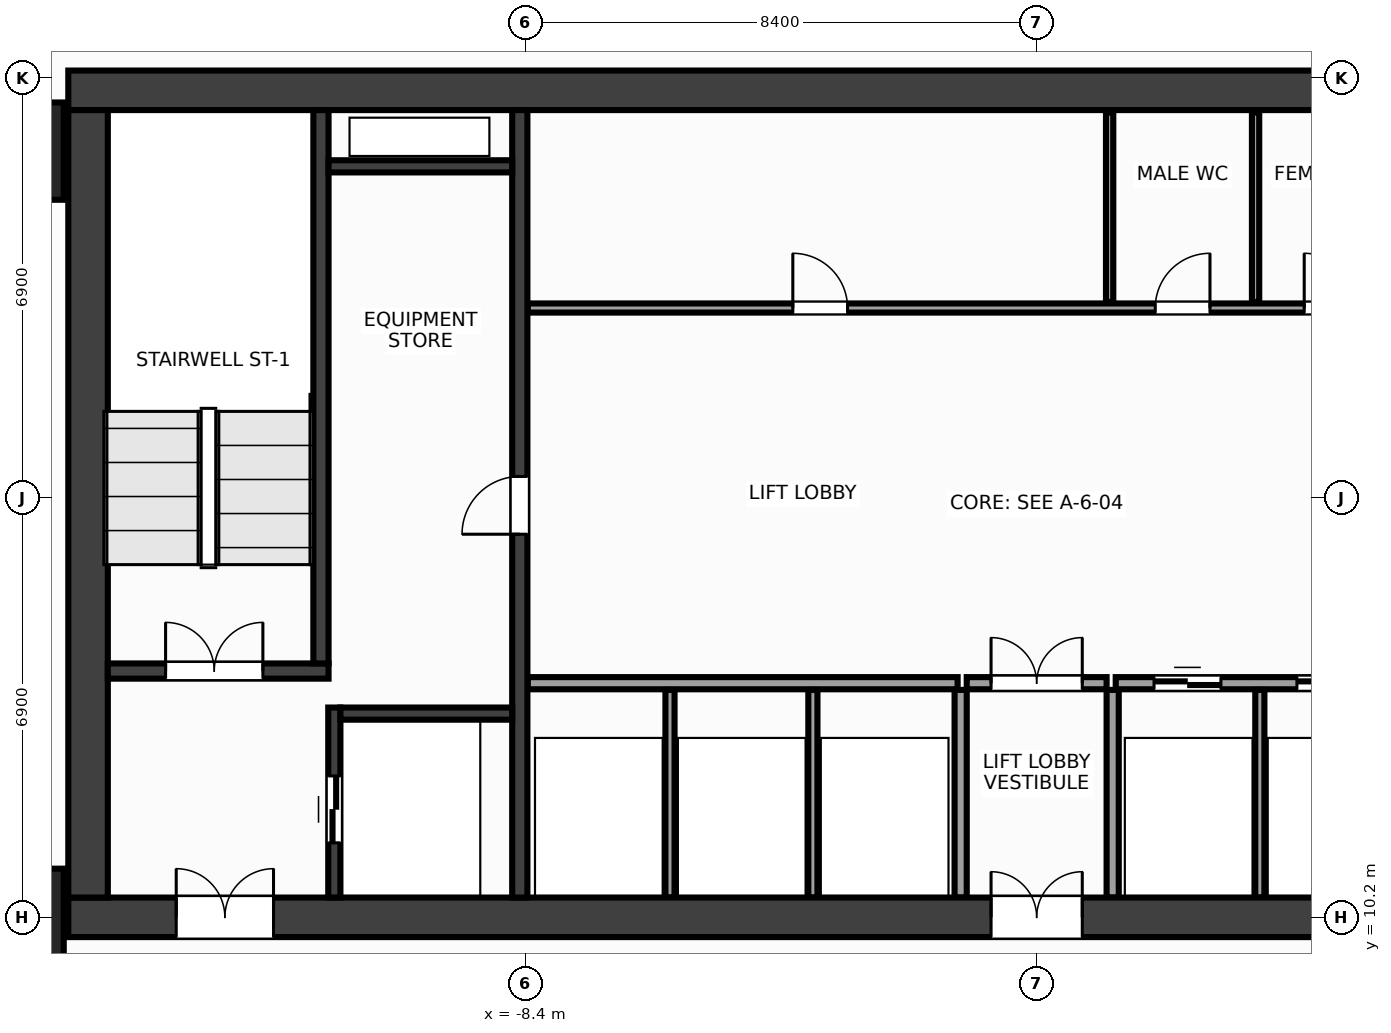
"""IFC4 building model, lengths in metres.
Left out: names, types, materials, properties, quantities, classifications, styles, units other than length and angle.
Written with IfcOpenShell. Run it as: python <this file> out.ifc"""

import sys

from ifc_helpers import new_model, si_unit, direction, frame, frame_2d, origin, origin_2d, place, context, subcontext, project, spatial, rectangle, extrude, source, transform, mapped, element, fill, save


model = new_model("IFC4")
c1 = context("Model", 3, precision=1e-05, world=origin(), true_north=direction((0.0, 1.0)))
c2 = subcontext(c1, "Body", "Model", "MODEL_VIEW")
j1 = project(units=[si_unit("LENGTHUNIT", "METRE"), si_unit("PLANEANGLEUNIT", "RADIAN")], contexts=[c1])
p1 = place(None, origin())
s1 = spatial("IfcSite", under=j1, at=p1, CompositionType="ELEMENT")
p2 = place(p1, origin())
s2 = spatial("IfcBuilding", under=s1, at=p2, CompositionType="ELEMENT")
p3 = place(p2, frame((0.0, 0.0, 81.2)))
s3 = spatial("IfcBuildingStorey", under=s2, at=p3, CompositionType="ELEMENT", Elevation=81.2)
m1 = source(origin(), c2, "Body", "SweptSolid", [
    extrude(rectangle(XDim=31.85, YDim=0.65, at=frame_2d((15.925, 0.0))), origin(), (0.0, 0.0, 1.0), 3.6),
])
p4 = place(p3, frame((-15.925, 23.8, 0.0), z_axis=(0.0, 0.0, 1.0), x_axis=(1.0, 0.0, 0.0)))
e1 = element("IfcWall", 1, at=p4, inside=s3, PredefinedType="SHEAR", context=c2, shape_type="MappedRepresentation", body=[
    mapped(m1, transform((0.0, 0.0, 0.0), x_axis=(1.0, 0.0, 0.0), y_axis=(0.0, 1.0, 0.0), z_axis=(0.0, 0.0, 1.0), scale=1.0)),
])
p5 = place(p3, frame((-15.925, 10.2, 0.0), z_axis=(0.0, 0.0, 1.0), x_axis=(1.0, 0.0, 0.0)))
e2 = element("IfcWall", 2, at=p5, inside=s3, PredefinedType="SHEAR", context=c2, shape_type="MappedRepresentation", body=[
    mapped(m1, transform((0.0, 0.0, 0.0), x_axis=(1.0, 0.0, 0.0), y_axis=(0.0, 1.0, 0.0), z_axis=(0.0, 0.0, 1.0), scale=1.0)),
])
p6 = place(p5, frame((1.775, 0.0, 0.0)))
e3 = element("IfcOpeningElement", 3, at=p6, cuts=e2, PredefinedType="OPENING", context=c2, shape_type="SweptSolid", body=[
    extrude(rectangle(XDim=1.6, YDim=2.15, at=frame_2d((0.8, 1.075))), frame((0.0, 0.337, 0.0), z_axis=(0.0, -1.0, 0.0), x_axis=(1.0, 0.0, 0.0)), (0.0, 0.0, 1.0), 0.674),
])
p7 = place(p5, frame((28.475, 0.0, 0.0)))
e4 = element("IfcOpeningElement", 4, at=p7, cuts=e2, PredefinedType="OPENING", context=c2, shape_type="SweptSolid", body=[
    extrude(rectangle(XDim=1.6, YDim=2.15, at=frame_2d((0.8, 1.075))), frame((0.0, 0.337, 0.0), z_axis=(0.0, -1.0, 0.0), x_axis=(1.0, 0.0, 0.0)), (0.0, 0.0, 1.0), 0.674),
])
p8 = place(p5, frame((15.175, 0.0, 0.0)))
e5 = element("IfcOpeningElement", 5, at=p8, cuts=e2, PredefinedType="OPENING", context=c2, shape_type="SweptSolid", body=[
    extrude(rectangle(XDim=1.5, YDim=2.2, at=frame_2d((0.75, 1.1))), frame((0.0, 0.337, 0.0), z_axis=(0.0, -1.0, 0.0), x_axis=(1.0, 0.0, 0.0)), (0.0, 0.0, 1.0), 0.674),
])
m2 = source(origin(), c2, "Body", "SweptSolid", [
    extrude(rectangle(XDim=12.95, YDim=0.65, at=frame_2d((6.475, 0.0))), origin(), (0.0, 0.0, 1.0), 3.6),
])
p9 = place(p3, frame((-15.6, 10.525, 0.0), z_axis=(0.0, 0.0, 1.0), x_axis=(0.0, 1.0, 0.0)))
e6 = element("IfcWall", 6, at=p9, inside=s3, PredefinedType="SHEAR", context=c2, shape_type="MappedRepresentation", body=[
    mapped(m2, transform((0.0, 0.0, 0.0), x_axis=(1.0, 0.0, 0.0), y_axis=(0.0, 1.0, 0.0), z_axis=(0.0, 0.0, 1.0), scale=1.0)),
])
m3 = source(origin(), c2, "Body", "SweptSolid", [
    extrude(rectangle(XDim=12.95, YDim=0.25, at=frame_2d((6.475, 0.0))), origin(), (0.0, 0.0, 1.0), 3.6),
])
p10 = place(p3, frame((-8.5, 10.525, 0.0), z_axis=(0.0, 0.0, 1.0), x_axis=(0.0, 1.0, 0.0)))
e7 = element("IfcWall", 7, at=p10, inside=s3, PredefinedType="SHEAR", context=c2, shape_type="MappedRepresentation", body=[
    mapped(m3, transform((0.0, 0.0, 0.0), x_axis=(1.0, 0.0, 0.0), y_axis=(0.0, 1.0, 0.0), z_axis=(0.0, 0.0, 1.0), scale=1.0)),
])
p11 = place(p10, frame((5.975, 0.0, 0.0)))
e8 = element("IfcOpeningElement", 8, at=p11, cuts=e7, PredefinedType="OPENING", context=c2, shape_type="SweptSolid", body=[
    extrude(rectangle(XDim=0.95, YDim=2.15, at=frame_2d((0.475, 1.075))), frame((0.0, 0.137, 0.0), z_axis=(0.0, -1.0, 0.0), x_axis=(1.0, 0.0, 0.0)), (0.0, 0.0, 1.0), 0.274),
])
m4 = source(origin(), c2, "Body", "SweptSolid", [
    extrude(rectangle(XDim=3.63, YDim=0.25, at=frame_2d((1.815, 0.0))), origin(), (0.0, 0.0, 1.0), 3.6),
])
p12 = place(p3, frame((-15.275, 14.25, 0.0), z_axis=(0.0, 0.0, 1.0), x_axis=(1.0, 0.0, 0.0)))
e9 = element("IfcWall", 9, at=p12, inside=s3, PredefinedType="SHEAR", context=c2, shape_type="MappedRepresentation", body=[
    mapped(m4, transform((0.0, 0.0, 0.0), x_axis=(1.0, 0.0, 0.0), y_axis=(0.0, 1.0, 0.0), z_axis=(0.0, 0.0, 1.0), scale=1.0)),
])
p13 = place(p12, frame((0.95, 0.0, 0.0)))
e10 = element("IfcOpeningElement", 10, at=p13, cuts=e9, PredefinedType="OPENING", context=c2, shape_type="SweptSolid", body=[
    extrude(rectangle(XDim=1.6, YDim=2.15, at=frame_2d((0.8, 1.075))), frame((0.0, 0.137, 0.0), z_axis=(0.0, -1.0, 0.0), x_axis=(1.0, 0.0, 0.0)), (0.0, 0.0, 1.0), 0.274),
])
m5 = source(origin(), c2, "Body", "SweptSolid", [
    extrude(rectangle(XDim=9.1, YDim=0.25, at=frame_2d((4.55, 0.0))), origin(), (0.0, 0.0, 1.0), 3.6),
])
p14 = place(p3, frame((-11.77, 14.375, 0.0), z_axis=(0.0, 0.0, 1.0), x_axis=(0.0, 1.0, 0.0)))
e11 = element("IfcWall", 11, at=p14, inside=s3, PredefinedType="SHEAR", context=c2, shape_type="MappedRepresentation", body=[
    mapped(m5, transform((0.0, 0.0, 0.0), x_axis=(1.0, 0.0, 0.0), y_axis=(0.0, 1.0, 0.0), z_axis=(0.0, 0.0, 1.0), scale=1.0)),
])
m6 = source(origin(), c2, "Body", "SweptSolid", [
    extrude(rectangle(XDim=3.125, YDim=0.2, at=frame_2d((1.562, 0.0))), origin(), (0.0, 0.0, 1.0), 3.6),
])
p15 = place(p3, frame((-11.55, 10.525, 0.0), z_axis=(0.0, 0.0, 1.0), x_axis=(0.0, 1.0, 0.0)))
e12 = element("IfcWall", 12, at=p15, inside=s3, PredefinedType="SHEAR", context=c2, shape_type="MappedRepresentation", body=[
    mapped(m6, transform((0.0, 0.0, 0.0), x_axis=(1.0, 0.0, 0.0), y_axis=(0.0, 1.0, 0.0), z_axis=(0.0, 0.0, 1.0), scale=1.0)),
])
p16 = place(p15, frame((0.9, 0.0, 0.0)))
e13 = element("IfcOpeningElement", 13, at=p16, cuts=e12, PredefinedType="OPENING", context=c2, shape_type="SweptSolid", body=[
    extrude(rectangle(XDim=1.1, YDim=2.15, at=frame_2d((0.55, 1.075))), frame((0.0, 0.112, 0.0), z_axis=(0.0, -1.0, 0.0), x_axis=(1.0, 0.0, 0.0)), (0.0, 0.0, 1.0), 0.224),
])
m7 = source(origin(), c2, "Body", "SweptSolid", [
    extrude(rectangle(XDim=2.825, YDim=0.2, at=frame_2d((1.413, 0.0))), origin(), (0.0, 0.0, 1.0), 3.6),
])
p17 = place(p3, frame((-11.45, 13.55, 0.0), z_axis=(0.0, 0.0, 1.0), x_axis=(1.0, 0.0, 0.0)))
e14 = element("IfcWall", 14, at=p17, inside=s3, PredefinedType="SHEAR", context=c2, shape_type="MappedRepresentation", body=[
    mapped(m7, transform((0.0, 0.0, 0.0), x_axis=(1.0, 0.0, 0.0), y_axis=(0.0, 1.0, 0.0), z_axis=(0.0, 0.0, 1.0), scale=1.0)),
])
m8 = source(origin(), c2, "Body", "SweptSolid", [
    extrude(rectangle(XDim=3.02, YDim=0.2, at=frame_2d((1.51, 0.0))), origin(), (0.0, 0.0, 1.0), 3.6),
])
p18 = place(p3, frame((-11.645, 22.55, 0.0), z_axis=(0.0, 0.0, 1.0), x_axis=(1.0, 0.0, 0.0)))
e15 = element("IfcWall", 15, at=p18, inside=s3, PredefinedType="SHEAR", context=c2, shape_type="MappedRepresentation", body=[
    mapped(m8, transform((0.0, 0.0, 0.0), x_axis=(1.0, 0.0, 0.0), y_axis=(0.0, 1.0, 0.0), z_axis=(0.0, 0.0, 1.0), scale=1.0)),
])
m9 = source(origin(), c2, "Body", "SweptSolid", [
    extrude(rectangle(XDim=1.6, YDim=1.6, at=origin_2d()), origin(), (0.0, 0.0, 1.0), 3.6),
])
for number, where, z_axis, x_axis in (
    (16, (-16.8, 10.2, 0.0), (0.0, 0.0, 1.0), (1.0, 0.0, 0.0)),
    (17, (-16.8, 22.8, 0.0), (0.0, 0.0, 1.0), (1.0, 0.0, 0.0)),
):
    element("IfcColumn", number, at=place(p3, frame(where, z_axis=z_axis, x_axis=x_axis)), inside=s3, PredefinedType="COLUMN", context=c2, shape_type="MappedRepresentation", body=[
        mapped(m9, transform((0.0, 0.0, 0.0), x_axis=(1.0, 0.0, 0.0), y_axis=(0.0, 1.0, 0.0), z_axis=(0.0, 0.0, 1.0), scale=1.0)),
    ])
m10 = source(origin(), c2, "Body", "SweptSolid", [
    extrude(rectangle(XDim=7.07, YDim=0.2, at=frame_2d((3.535, 0.0))), origin(), (0.0, 0.0, 1.0), 3.36),
])
p19 = place(p3, frame((-8.37, 14.05, 0.0), z_axis=(0.0, 0.0, 1.0), x_axis=(1.0, 0.0, 0.0)))
e18 = element("IfcWall", 18, at=p19, inside=s3, PredefinedType="PARTITIONING", context=c2, shape_type="MappedRepresentation", body=[
    mapped(m10, transform((0.0, 0.0, 0.0), x_axis=(1.0, 0.0, 0.0), y_axis=(0.0, 1.0, 0.0), z_axis=(0.0, 0.0, 1.0), scale=1.0)),
])
p20 = place(p3, frame((1.3, 14.05, 0.0), z_axis=(0.0, 0.0, 1.0), x_axis=(1.0, 0.0, 0.0)))
e19 = element("IfcWall", 19, at=p20, inside=s3, PredefinedType="PARTITIONING", context=c2, shape_type="MappedRepresentation", body=[
    mapped(m10, transform((0.0, 0.0, 0.0), x_axis=(1.0, 0.0, 0.0), y_axis=(0.0, 1.0, 0.0), z_axis=(0.0, 0.0, 1.0), scale=1.0)),
])
p21 = place(p20, frame((0.63, 0.0, 0.0)))
e20 = element("IfcOpeningElement", 20, at=p21, cuts=e19, PredefinedType="OPENING", context=c2, shape_type="SweptSolid", body=[
    extrude(rectangle(XDim=1.1, YDim=2.15, at=frame_2d((0.55, 1.075))), frame((0.0, 0.112, 0.0), z_axis=(0.0, -1.0, 0.0), x_axis=(1.0, 0.0, 0.0)), (0.0, 0.0, 1.0), 0.224),
])
p22 = place(p20, frame((2.98, 0.0, 0.0)))
e21 = element("IfcOpeningElement", 21, at=p22, cuts=e19, PredefinedType="OPENING", context=c2, shape_type="SweptSolid", body=[
    extrude(rectangle(XDim=1.1, YDim=2.15, at=frame_2d((0.55, 1.075))), frame((0.0, 0.112, 0.0), z_axis=(0.0, -1.0, 0.0), x_axis=(1.0, 0.0, 0.0)), (0.0, 0.0, 1.0), 0.224),
])
p23 = place(p20, frame((5.33, 0.0, 0.0)))
e22 = element("IfcOpeningElement", 22, at=p23, cuts=e19, PredefinedType="OPENING", context=c2, shape_type="SweptSolid", body=[
    extrude(rectangle(XDim=1.1, YDim=2.15, at=frame_2d((0.55, 1.075))), frame((0.0, 0.112, 0.0), z_axis=(0.0, -1.0, 0.0), x_axis=(1.0, 0.0, 0.0)), (0.0, 0.0, 1.0), 0.224),
])
m11 = source(origin(), c2, "Body", "SweptSolid", [
    extrude(rectangle(XDim=3.415, YDim=0.2, at=frame_2d((1.708, 0.0))), origin(), (0.0, 0.0, 1.0), 3.36),
])
for number, where, z_axis, x_axis in (
    (23, (-1.25, 10.525, 0.0), (0.0, 0.0, 1.0), (0.0, 1.0, 0.0)),
    (24, (1.25, 10.525, 0.0), (0.0, 0.0, 1.0), (0.0, 1.0, 0.0)),
):
    element("IfcWall", number, at=place(p3, frame(where, z_axis=z_axis, x_axis=x_axis)), inside=s3, PredefinedType="PARTITIONING", context=c2, shape_type="MappedRepresentation", body=[
        mapped(m11, transform((0.0, 0.0, 0.0), x_axis=(1.0, 0.0, 0.0), y_axis=(0.0, 1.0, 0.0), z_axis=(0.0, 0.0, 1.0), scale=1.0)),
    ])
m12 = source(origin(), c2, "Body", "SweptSolid", [
    extrude(rectangle(XDim=2.3, YDim=0.2, at=frame_2d((1.15, 0.0))), origin(), (0.0, 0.0, 1.0), 3.36),
])
p24 = place(p3, frame((-1.15, 14.05, 0.0), z_axis=(0.0, 0.0, 1.0), x_axis=(1.0, 0.0, 0.0)))
e25 = element("IfcWall", 25, at=p24, inside=s3, PredefinedType="PARTITIONING", context=c2, shape_type="MappedRepresentation", body=[
    mapped(m12, transform((0.0, 0.0, 0.0), x_axis=(1.0, 0.0, 0.0), y_axis=(0.0, 1.0, 0.0), z_axis=(0.0, 0.0, 1.0), scale=1.0)),
])
p25 = place(p24, frame((0.4, 0.0, 0.0)))
e26 = element("IfcOpeningElement", 26, at=p25, cuts=e25, PredefinedType="OPENING", context=c2, shape_type="SweptSolid", body=[
    extrude(rectangle(XDim=1.5, YDim=2.2, at=frame_2d((0.75, 1.1))), frame((0.0, 0.112, 0.0), z_axis=(0.0, -1.0, 0.0), x_axis=(1.0, 0.0, 0.0)), (0.0, 0.0, 1.0), 0.224),
])
m13 = source(origin(), c2, "Body", "SweptSolid", [
    extrude(rectangle(XDim=14.59, YDim=0.15, at=frame_2d((7.295, 0.0))), origin(), (0.0, 0.0, 1.0), 3.36),
])
p26 = place(p3, frame((-8.37, 20.22, 0.0), z_axis=(0.0, 0.0, 1.0), x_axis=(1.0, 0.0, 0.0)))
e27 = element("IfcWall", 27, at=p26, inside=s3, PredefinedType="PARTITIONING", context=c2, shape_type="MappedRepresentation", body=[
    mapped(m13, transform((0.0, 0.0, 0.0), x_axis=(1.0, 0.0, 0.0), y_axis=(0.0, 1.0, 0.0), z_axis=(0.0, 0.0, 1.0), scale=1.0)),
])
p27 = place(p26, frame((4.36, 0.0, 0.0)))
e28 = element("IfcOpeningElement", 28, at=p27, cuts=e27, PredefinedType="OPENING", context=c2, shape_type="SweptSolid", body=[
    extrude(rectangle(XDim=0.9, YDim=2.15, at=frame_2d((0.45, 1.075))), frame((0.0, 0.087, 0.0), z_axis=(0.0, -1.0, 0.0), x_axis=(1.0, 0.0, 0.0)), (0.0, 0.0, 1.0), 0.174),
])
p28 = place(p26, frame((10.32, 0.0, 0.0)))
e29 = element("IfcOpeningElement", 29, at=p28, cuts=e27, PredefinedType="OPENING", context=c2, shape_type="SweptSolid", body=[
    extrude(rectangle(XDim=0.9, YDim=2.15, at=frame_2d((0.45, 1.075))), frame((0.0, 0.087, 0.0), z_axis=(0.0, -1.0, 0.0), x_axis=(1.0, 0.0, 0.0)), (0.0, 0.0, 1.0), 0.174),
])
p29 = place(p26, frame((12.77, 0.0, 0.0)))
e30 = element("IfcOpeningElement", 30, at=p29, cuts=e27, PredefinedType="OPENING", context=c2, shape_type="SweptSolid", body=[
    extrude(rectangle(XDim=0.9, YDim=2.15, at=frame_2d((0.45, 1.075))), frame((0.0, 0.087, 0.0), z_axis=(0.0, -1.0, 0.0), x_axis=(1.0, 0.0, 0.0)), (0.0, 0.0, 1.0), 0.174),
])
m14 = source(origin(), c2, "Body", "SweptSolid", [
    extrude(rectangle(XDim=3.415, YDim=0.15, at=frame_2d((1.708, 0.0))), origin(), (0.0, 0.0, 1.0), 3.36),
])
for number, where, z_axis, x_axis in (
    (31, (-6.03, 10.525, 0.0), (0.0, 0.0, 1.0), (0.0, 1.0, 0.0)),
    (32, (-3.68, 10.525, 0.0), (0.0, 0.0, 1.0), (0.0, 1.0, 0.0)),
    (33, (3.67, 10.525, 0.0), (0.0, 0.0, 1.0), (0.0, 1.0, 0.0)),
):
    element("IfcWall", number, at=place(p3, frame(where, z_axis=z_axis, x_axis=x_axis)), inside=s3, PredefinedType="PARTITIONING", context=c2, shape_type="MappedRepresentation", body=[
        mapped(m14, transform((0.0, 0.0, 0.0), x_axis=(1.0, 0.0, 0.0), y_axis=(0.0, 1.0, 0.0), z_axis=(0.0, 0.0, 1.0), scale=1.0)),
    ])
m15 = source(origin(), c2, "Body", "SweptSolid", [
    extrude(rectangle(XDim=3.115, YDim=0.12, at=frame_2d((1.558, 0.0))), origin(), (0.0, 0.0, 1.0), 3.36),
])
for number, where, z_axis, x_axis in (
    (34, (1.2, 20.32, 0.0), (0.0, 0.0, 1.0), (0.0, 1.0, 0.0)),
    (35, (3.6, 20.32, 0.0), (0.0, 0.0, 1.0), (0.0, 1.0, 0.0)),
):
    element("IfcWall", number, at=place(p3, frame(where, z_axis=z_axis, x_axis=x_axis)), inside=s3, PredefinedType="PARTITIONING", context=c2, shape_type="MappedRepresentation", body=[
        mapped(m15, transform((0.0, 0.0, 0.0), x_axis=(1.0, 0.0, 0.0), y_axis=(0.0, 1.0, 0.0), z_axis=(0.0, 0.0, 1.0), scale=1.0)),
    ])
m16 = source(origin(), c2, "Body", "SweptSolid", [
    extrude(rectangle(XDim=1.6, YDim=2.15, at=frame_2d((0.8, 1.075))), frame((0.0, 0.025, 0.0), z_axis=(0.0, -1.0, 0.0), x_axis=(1.0, 0.0, 0.0)), (0.0, 0.0, 1.0), 0.05),
])
p30 = place(p13, origin())
e36 = element("IfcDoor", 36, at=p30, inside=s3, OperationType="DOUBLE_DOOR_SINGLE_SWING", PredefinedType="DOOR", context=c2, shape_type="MappedRepresentation", body=[
    mapped(m16, transform((0.0, 0.0, 0.0), x_axis=(1.0, 0.0, 0.0), y_axis=(0.0, 1.0, 0.0), z_axis=(0.0, 0.0, 1.0), scale=1.0)),
])
fill(e10, e36)
p31 = place(p6, origin())
e37 = element("IfcDoor", 37, at=p31, inside=s3, OperationType="DOUBLE_DOOR_SINGLE_SWING", PredefinedType="DOOR", context=c2, shape_type="MappedRepresentation", body=[
    mapped(m16, transform((0.0, 0.0, 0.0), x_axis=(1.0, 0.0, 0.0), y_axis=(0.0, 1.0, 0.0), z_axis=(0.0, 0.0, 1.0), scale=1.0)),
])
fill(e3, e37)
m17 = source(origin(), c2, "Body", "SweptSolid", [
    extrude(rectangle(XDim=1.1, YDim=2.15, at=frame_2d((0.55, 1.075))), frame((0.0, 0.025, 0.0), z_axis=(0.0, -1.0, 0.0), x_axis=(1.0, 0.0, 0.0)), (0.0, 0.0, 1.0), 0.05),
])
p32 = place(p16, origin())
e38 = element("IfcDoor", 38, at=p32, inside=s3, OperationType="DOUBLE_DOOR_SLIDING", PredefinedType="DOOR", context=c2, shape_type="MappedRepresentation", body=[
    mapped(m17, transform((0.0, 0.0, 0.0), x_axis=(1.0, 0.0, 0.0), y_axis=(0.0, 1.0, 0.0), z_axis=(0.0, 0.0, 1.0), scale=1.0)),
])
fill(e13, e38)
m18 = source(origin(), c2, "Body", "SweptSolid", [
    extrude(rectangle(XDim=0.95, YDim=2.15, at=frame_2d((0.475, 1.075))), frame((0.0, 0.025, 0.0), z_axis=(0.0, -1.0, 0.0), x_axis=(1.0, 0.0, 0.0)), (0.0, 0.0, 1.0), 0.05),
])
p33 = place(p11, origin())
e39 = element("IfcDoor", 39, at=p33, inside=s3, OperationType="SINGLE_SWING_LEFT", PredefinedType="DOOR", context=c2, shape_type="MappedRepresentation", body=[
    mapped(m18, transform((0.0, 0.0, 0.0), x_axis=(1.0, 0.0, 0.0), y_axis=(0.0, 1.0, 0.0), z_axis=(0.0, 0.0, 1.0), scale=1.0)),
])
fill(e8, e39)
p34 = place(p21, origin())
e40 = element("IfcDoor", 40, at=p34, inside=s3, OperationType="DOUBLE_DOOR_SLIDING", PredefinedType="DOOR", context=c2, shape_type="MappedRepresentation", body=[
    mapped(m17, transform((0.0, 0.0, 0.0), x_axis=(1.0, 0.0, 0.0), y_axis=(0.0, 1.0, 0.0), z_axis=(0.0, 0.0, 1.0), scale=1.0)),
])
fill(e20, e40)
p35 = place(p22, origin())
e41 = element("IfcDoor", 41, at=p35, inside=s3, OperationType="DOUBLE_DOOR_SLIDING", PredefinedType="DOOR", context=c2, shape_type="MappedRepresentation", body=[
    mapped(m17, transform((0.0, 0.0, 0.0), x_axis=(1.0, 0.0, 0.0), y_axis=(0.0, 1.0, 0.0), z_axis=(0.0, 0.0, 1.0), scale=1.0)),
])
fill(e21, e41)
m19 = source(origin(), c2, "Body", "SweptSolid", [
    extrude(rectangle(XDim=1.5, YDim=2.2, at=frame_2d((0.75, 1.1))), frame((0.0, 0.025, 0.0), z_axis=(0.0, -1.0, 0.0), x_axis=(1.0, 0.0, 0.0)), (0.0, 0.0, 1.0), 0.05),
])
p36 = place(p25, origin())
e42 = element("IfcDoor", 42, at=p36, inside=s3, OperationType="DOUBLE_DOOR_SINGLE_SWING", PredefinedType="DOOR", context=c2, shape_type="MappedRepresentation", body=[
    mapped(m19, transform((0.0, 0.0, 0.0), x_axis=(1.0, 0.0, 0.0), y_axis=(0.0, 1.0, 0.0), z_axis=(0.0, 0.0, 1.0), scale=1.0)),
])
fill(e26, e42)
p37 = place(p8, origin())
e43 = element("IfcDoor", 43, at=p37, inside=s3, OperationType="DOUBLE_DOOR_SINGLE_SWING", PredefinedType="DOOR", context=c2, shape_type="MappedRepresentation", body=[
    mapped(m19, transform((0.0, 0.0, 0.0), x_axis=(1.0, 0.0, 0.0), y_axis=(0.0, 1.0, 0.0), z_axis=(0.0, 0.0, 1.0), scale=1.0)),
])
fill(e5, e43)
m20 = source(origin(), c2, "Body", "SweptSolid", [
    extrude(rectangle(XDim=0.9, YDim=2.15, at=frame_2d((0.45, 1.075))), frame((0.0, 0.025, 0.0), z_axis=(0.0, -1.0, 0.0), x_axis=(1.0, 0.0, 0.0)), (0.0, 0.0, 1.0), 0.05),
])
p38 = place(p27, origin())
e44 = element("IfcDoor", 44, at=p38, inside=s3, OperationType="SINGLE_SWING_LEFT", PredefinedType="DOOR", context=c2, shape_type="MappedRepresentation", body=[
    mapped(m20, transform((0.0, 0.0, 0.0), x_axis=(1.0, 0.0, 0.0), y_axis=(0.0, 1.0, 0.0), z_axis=(0.0, 0.0, 1.0), scale=1.0)),
])
fill(e28, e44)
p39 = place(p28, origin())
e45 = element("IfcDoor", 45, at=p39, inside=s3, OperationType="SINGLE_SWING_RIGHT", PredefinedType="DOOR", context=c2, shape_type="MappedRepresentation", body=[
    mapped(m20, transform((0.0, 0.0, 0.0), x_axis=(1.0, 0.0, 0.0), y_axis=(0.0, 1.0, 0.0), z_axis=(0.0, 0.0, 1.0), scale=1.0)),
])
fill(e29, e45)
p40 = place(p29, origin())
e46 = element("IfcDoor", 46, at=p40, inside=s3, OperationType="SINGLE_SWING_LEFT", PredefinedType="DOOR", context=c2, shape_type="MappedRepresentation", body=[
    mapped(m20, transform((0.0, 0.0, 0.0), x_axis=(1.0, 0.0, 0.0), y_axis=(0.0, 1.0, 0.0), z_axis=(0.0, 0.0, 1.0), scale=1.0)),
])
fill(e30, e46)
save(model, sys.argv[1])
